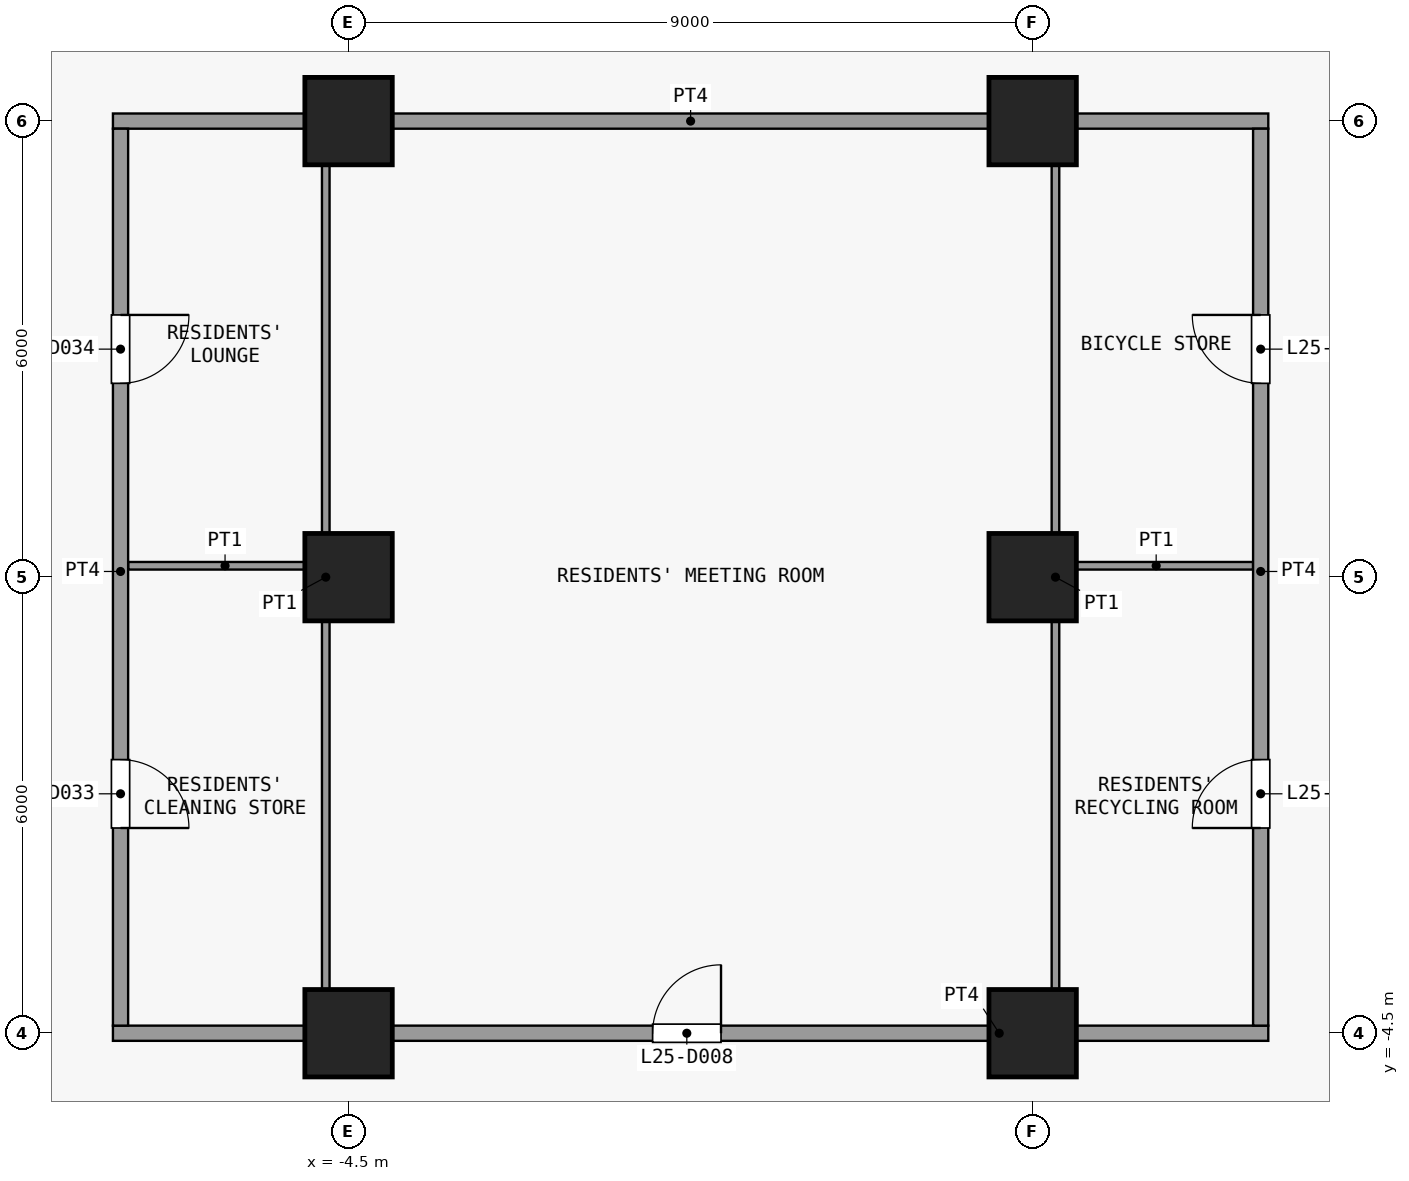
"""IFC4 building model, lengths in metres.
Left out: names, types, materials, properties, quantities, classifications, styles, units other than length and angle.
Written with IfcOpenShell. Run it as: python <this file> out.ifc"""

import sys

from ifc_helpers import new_model, si_unit, direction, frame, frame_2d, origin, origin_2d, place, context, subcontext, project, spatial, rectangle, extrude, element, fill, save


model = new_model("IFC4")
c1 = context("Model", 3, precision=1e-05, world=origin(), true_north=direction((0.0, 1.0)))
c2 = subcontext(c1, "Body", "Model", "MODEL_VIEW")
j1 = project(units=[si_unit("LENGTHUNIT", "METRE"), si_unit("PLANEANGLEUNIT", "RADIAN")], contexts=[c1])
p1 = place(None, origin())
s1 = spatial("IfcSite", under=j1, at=p1, CompositionType="ELEMENT")
p2 = place(p1, origin())
s2 = spatial("IfcBuilding", under=s1, at=p2, CompositionType="ELEMENT")
p3 = place(p2, frame((0.0, 0.0, 102.7)))
s3 = spatial("IfcBuildingStorey", under=s2, at=p3, CompositionType="ELEMENT", Elevation=102.7)
for number, where, z_axis, x_axis in (
    (1, (-4.5, -4.5, 0.0), (0.0, 0.0, 1.0), (1.0, 0.0, 0.0)),
    (2, (-4.5, 1.5, 0.0), (0.0, 0.0, 1.0), (1.0, 0.0, 0.0)),
    (3, (-4.5, 7.5, 0.0), (0.0, 0.0, 1.0), (1.0, 0.0, 0.0)),
    (4, (4.5, -4.5, 0.0), (0.0, 0.0, 1.0), (1.0, 0.0, 0.0)),
    (5, (4.5, 1.5, 0.0), (0.0, 0.0, 1.0), (1.0, 0.0, 0.0)),
    (6, (4.5, 7.5, 0.0), (0.0, 0.0, 1.0), (1.0, 0.0, 0.0)),
):
    element("IfcColumn", number, at=place(p3, frame(where, z_axis=z_axis, x_axis=x_axis)), inside=s3, PredefinedType="COLUMN", context=c2, shape_type="SweptSolid", body=[
        extrude(rectangle(XDim=1.15, YDim=1.15, at=origin_2d()), origin(), (0.0, 0.0, 1.0), 3.6),
    ])
p4 = place(p3, frame((-7.6, -4.5, 0.0), z_axis=(0.0, 0.0, 1.0), x_axis=(1.0, 0.0, 0.0)))
e7 = element("IfcWall", 7, at=p4, inside=s3, PredefinedType="PARTITIONING", context=c2, shape_type="SweptSolid", body=[
    extrude(rectangle(XDim=15.2, YDim=0.2, at=frame_2d((7.6, 0.0))), origin(), (0.0, 0.0, 1.0), 3.3),
])
p5 = place(p4, frame((7.1, 0.0, 0.0)))
e8 = element("IfcOpeningElement", 8, at=p5, cuts=e7, PredefinedType="OPENING", context=c2, shape_type="SweptSolid", body=[
    extrude(rectangle(XDim=0.9, YDim=2.1, at=frame_2d((0.45, 1.05))), frame((0.0, 0.11, 0.0), z_axis=(0.0, -1.0, 0.0), x_axis=(1.0, 0.0, 0.0)), (0.0, 0.0, 1.0), 0.22),
])
for number, where, z_axis, x_axis in (
    (9, (-7.4, 1.65, 0.0), (0.0, 0.0, 1.0), (1.0, 0.0, 0.0)),
    (10, (4.85, 1.65, 0.0), (0.0, 0.0, 1.0), (1.0, 0.0, 0.0)),
):
    element("IfcWall", number, at=place(p3, frame(where, z_axis=z_axis, x_axis=x_axis)), inside=s3, PredefinedType="PARTITIONING", context=c2, shape_type="SweptSolid", body=[
        extrude(rectangle(XDim=2.55, YDim=0.1, at=frame_2d((1.275, 0.0))), origin(), (0.0, 0.0, 1.0), 3.3),
    ])
p6 = place(p3, frame((-7.6, 7.5, 0.0), z_axis=(0.0, 0.0, 1.0), x_axis=(1.0, 0.0, 0.0)))
e11 = element("IfcWall", 11, at=p6, inside=s3, PredefinedType="PARTITIONING", context=c2, shape_type="SweptSolid", body=[
    extrude(rectangle(XDim=15.2, YDim=0.2, at=frame_2d((7.6, 0.0))), origin(), (0.0, 0.0, 1.0), 3.3),
])
p7 = place(p3, frame((-7.5, -4.4, 0.0), z_axis=(0.0, 0.0, 1.0), x_axis=(0.0, 1.0, 0.0)))
e12 = element("IfcWall", 12, at=p7, inside=s3, PredefinedType="PARTITIONING", context=c2, shape_type="SweptSolid", body=[
    extrude(rectangle(XDim=11.8, YDim=0.2, at=frame_2d((5.9, 0.0))), origin(), (0.0, 0.0, 1.0), 3.3),
])
p8 = place(p7, frame((2.6, 0.0, 0.0)))
e13 = element("IfcOpeningElement", 13, at=p8, cuts=e12, PredefinedType="OPENING", context=c2, shape_type="SweptSolid", body=[
    extrude(rectangle(XDim=0.9, YDim=2.1, at=frame_2d((0.45, 1.05))), frame((0.0, 0.11, 0.0), z_axis=(0.0, -1.0, 0.0), x_axis=(1.0, 0.0, 0.0)), (0.0, 0.0, 1.0), 0.22),
])
p9 = place(p7, frame((8.45, 0.0, 0.0)))
e14 = element("IfcOpeningElement", 14, at=p9, cuts=e12, PredefinedType="OPENING", context=c2, shape_type="SweptSolid", body=[
    extrude(rectangle(XDim=0.9, YDim=2.1, at=frame_2d((0.45, 1.05))), frame((0.0, 0.11, 0.0), z_axis=(0.0, -1.0, 0.0), x_axis=(1.0, 0.0, 0.0)), (0.0, 0.0, 1.0), 0.22),
])
for number, where, z_axis, x_axis in (
    (15, (-4.8, -4.4, 0.0), (0.0, 0.0, 1.0), (0.0, 1.0, 0.0)),
    (16, (4.8, -4.4, 0.0), (0.0, 0.0, 1.0), (0.0, 1.0, 0.0)),
):
    element("IfcWall", number, at=place(p3, frame(where, z_axis=z_axis, x_axis=x_axis)), inside=s3, PredefinedType="PARTITIONING", context=c2, shape_type="SweptSolid", body=[
        extrude(rectangle(XDim=11.8, YDim=0.1, at=frame_2d((5.9, 0.0))), origin(), (0.0, 0.0, 1.0), 3.3),
    ])
p10 = place(p3, frame((7.5, -4.4, 0.0), z_axis=(0.0, 0.0, 1.0), x_axis=(0.0, 1.0, 0.0)))
e17 = element("IfcWall", 17, at=p10, inside=s3, PredefinedType="PARTITIONING", context=c2, shape_type="SweptSolid", body=[
    extrude(rectangle(XDim=11.8, YDim=0.2, at=frame_2d((5.9, 0.0))), origin(), (0.0, 0.0, 1.0), 3.3),
])
p11 = place(p10, frame((2.6, 0.0, 0.0)))
e18 = element("IfcOpeningElement", 18, at=p11, cuts=e17, PredefinedType="OPENING", context=c2, shape_type="SweptSolid", body=[
    extrude(rectangle(XDim=0.9, YDim=2.1, at=frame_2d((0.45, 1.05))), frame((0.0, 0.11, 0.0), z_axis=(0.0, -1.0, 0.0), x_axis=(1.0, 0.0, 0.0)), (0.0, 0.0, 1.0), 0.22),
])
p12 = place(p10, frame((8.45, 0.0, 0.0)))
e19 = element("IfcOpeningElement", 19, at=p12, cuts=e17, PredefinedType="OPENING", context=c2, shape_type="SweptSolid", body=[
    extrude(rectangle(XDim=0.9, YDim=2.1, at=frame_2d((0.45, 1.05))), frame((0.0, 0.11, 0.0), z_axis=(0.0, -1.0, 0.0), x_axis=(1.0, 0.0, 0.0)), (0.0, 0.0, 1.0), 0.22),
])
p13 = place(p5, origin())
e20 = element("IfcDoor", 20, at=p13, inside=s3, OperationType="SINGLE_SWING_LEFT", PredefinedType="DOOR", context=c2, shape_type="SweptSolid", body=[
    extrude(rectangle(XDim=0.9, YDim=2.1, at=frame_2d((0.45, 1.05))), frame((0.0, 0.025, 0.0), z_axis=(0.0, -1.0, 0.0), x_axis=(1.0, 0.0, 0.0)), (0.0, 0.0, 1.0), 0.05),
])
fill(e8, e20)
p14 = place(p8, origin())
e21 = element("IfcDoor", 21, at=p14, inside=s3, OperationType="SINGLE_SWING_LEFT", PredefinedType="DOOR", context=c2, shape_type="SweptSolid", body=[
    extrude(rectangle(XDim=0.9, YDim=2.1, at=frame_2d((0.45, 1.05))), frame((0.0, 0.025, 0.0), z_axis=(0.0, -1.0, 0.0), x_axis=(1.0, 0.0, 0.0)), (0.0, 0.0, 1.0), 0.05),
])
fill(e13, e21)
p15 = place(p9, origin())
e22 = element("IfcDoor", 22, at=p15, inside=s3, OperationType="SINGLE_SWING_RIGHT", PredefinedType="DOOR", context=c2, shape_type="SweptSolid", body=[
    extrude(rectangle(XDim=0.9, YDim=2.1, at=frame_2d((0.45, 1.05))), frame((0.0, 0.025, 0.0), z_axis=(0.0, -1.0, 0.0), x_axis=(1.0, 0.0, 0.0)), (0.0, 0.0, 1.0), 0.05),
])
fill(e14, e22)
p16 = place(p11, origin())
e23 = element("IfcDoor", 23, at=p16, inside=s3, OperationType="SINGLE_SWING_RIGHT", PredefinedType="DOOR", context=c2, shape_type="SweptSolid", body=[
    extrude(rectangle(XDim=0.9, YDim=2.1, at=frame_2d((0.45, 1.05))), frame((0.0, 0.025, 0.0), z_axis=(0.0, -1.0, 0.0), x_axis=(1.0, 0.0, 0.0)), (0.0, 0.0, 1.0), 0.05),
])
fill(e18, e23)
p17 = place(p12, origin())
e24 = element("IfcDoor", 24, at=p17, inside=s3, OperationType="SINGLE_SWING_LEFT", PredefinedType="DOOR", context=c2, shape_type="SweptSolid", body=[
    extrude(rectangle(XDim=0.9, YDim=2.1, at=frame_2d((0.45, 1.05))), frame((0.0, 0.025, 0.0), z_axis=(0.0, -1.0, 0.0), x_axis=(1.0, 0.0, 0.0)), (0.0, 0.0, 1.0), 0.05),
])
fill(e19, e24)
save(model, sys.argv[1])
